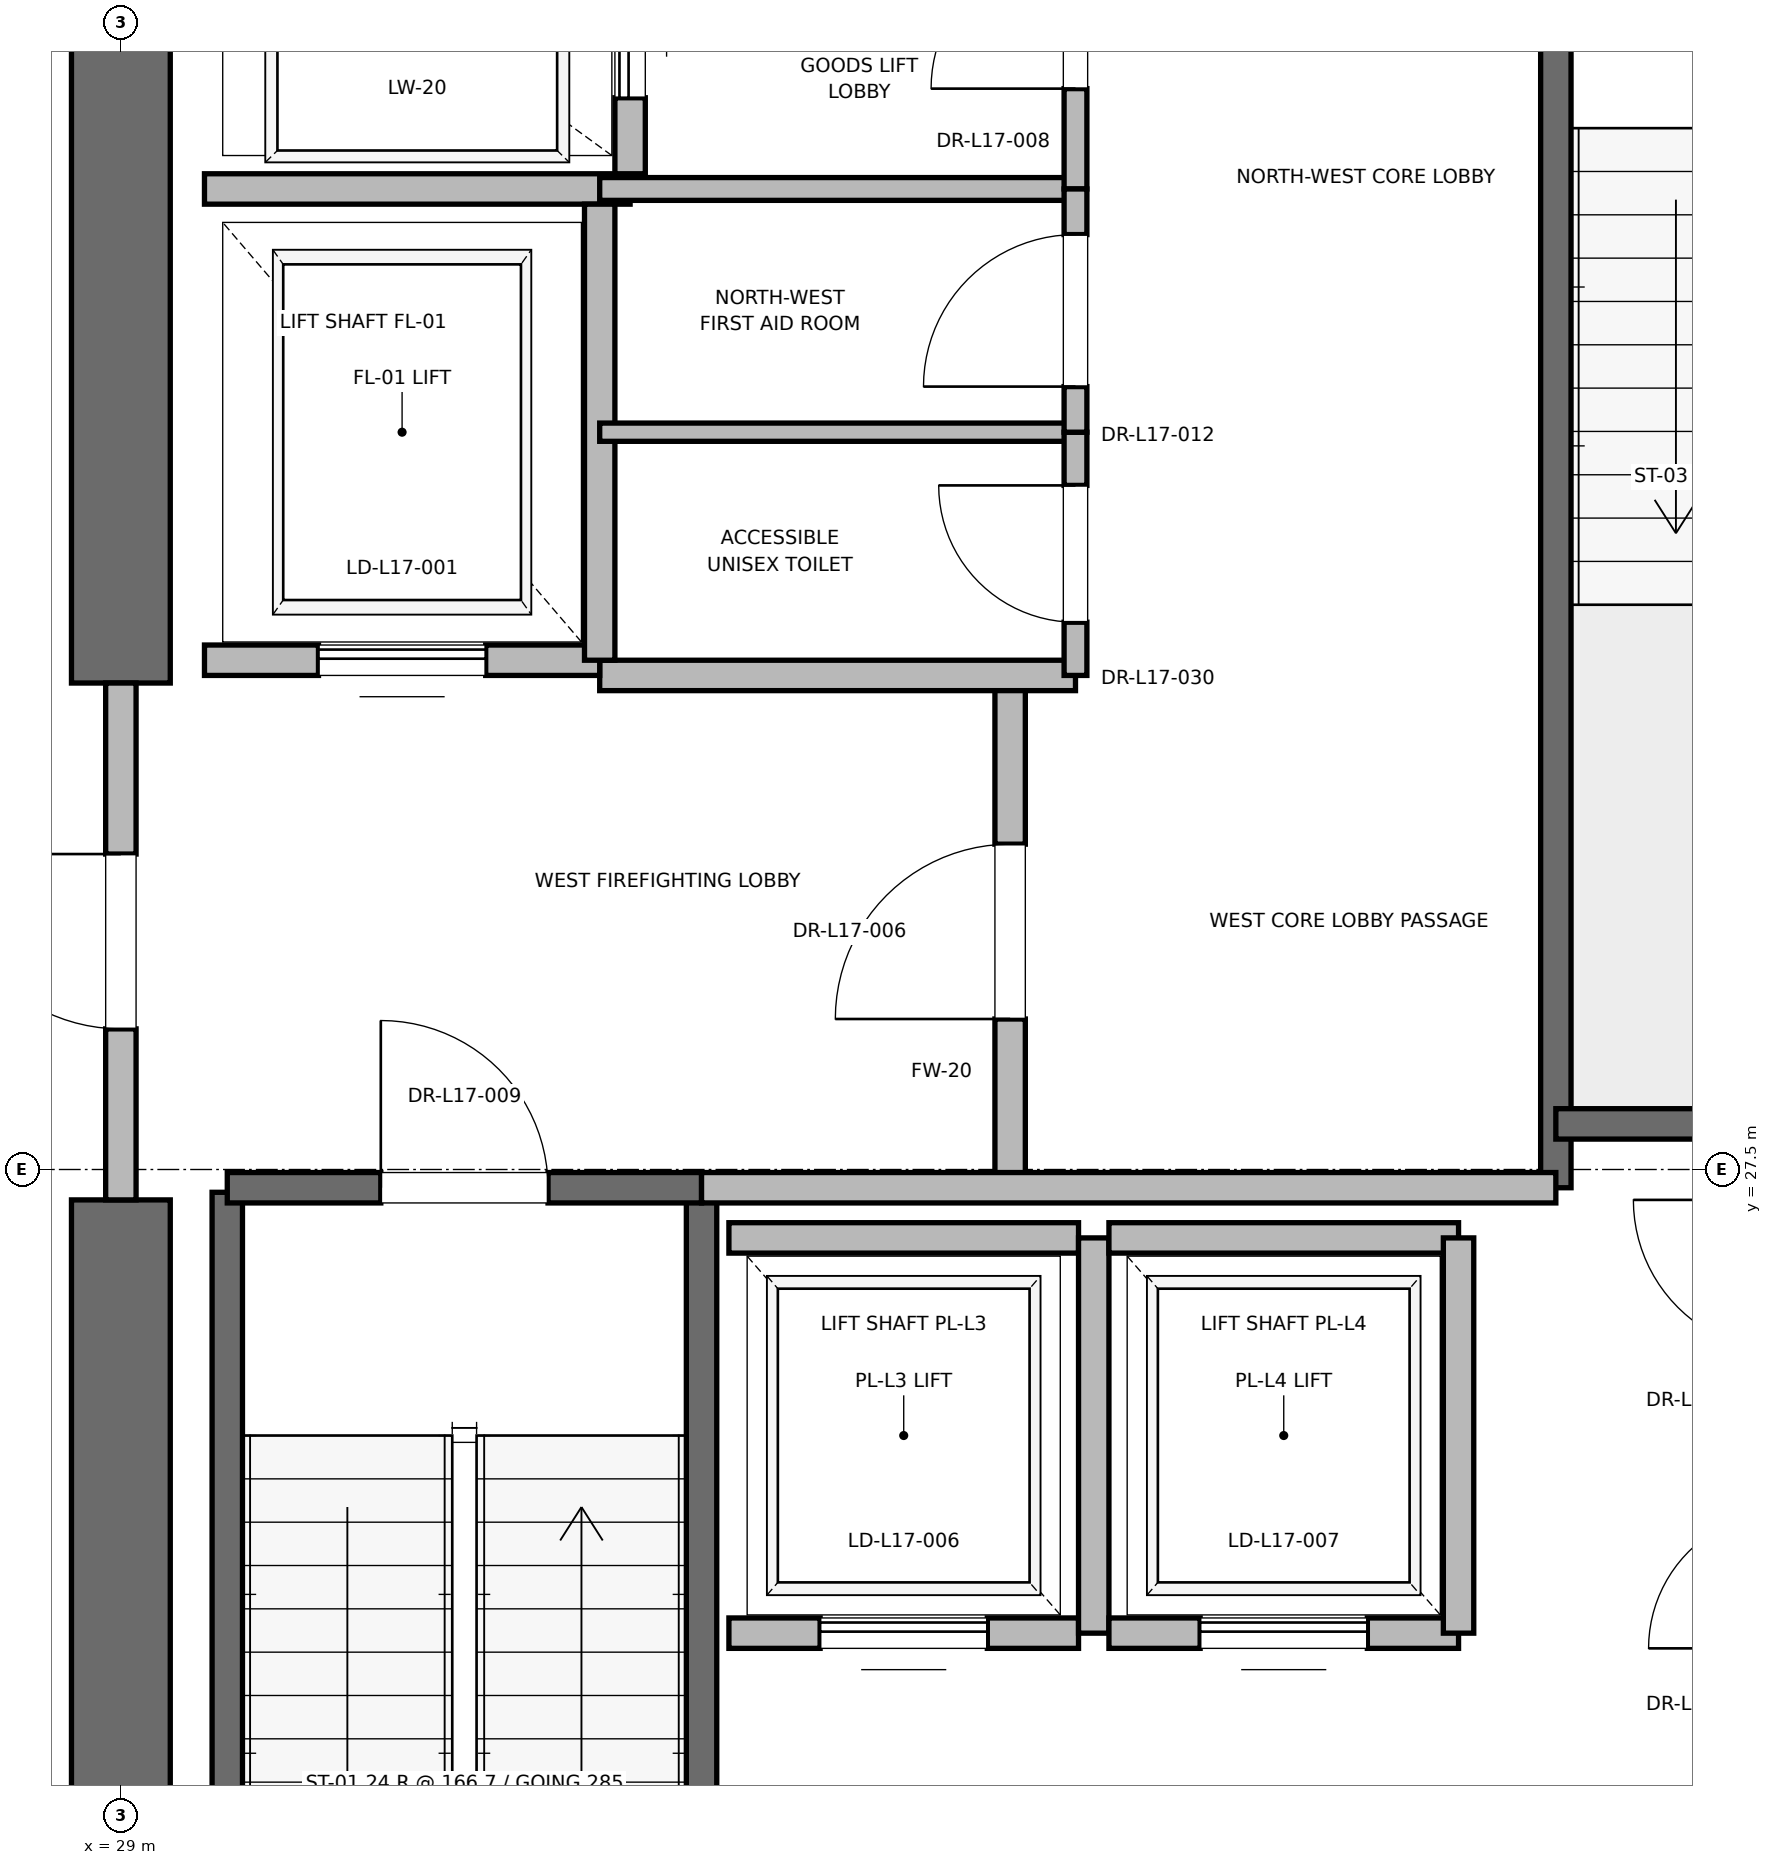
"""IFC4 building model, lengths in metres.
Left out: names, types, materials, properties, quantities, classifications, styles, units other than length and angle.
Written with IfcOpenShell. Run it as: python <this file> out.ifc"""

import sys

from ifc_helpers import new_model, si_unit, direction, frame, frame_2d, origin, place, context, subcontext, project, spatial, rectangle, extrude, element, fill, save


model = new_model("IFC4")
c1 = context("Model", 3, precision=1e-05, world=origin(), true_north=direction((0.0, 1.0)))
c2 = subcontext(c1, "Body", "Model", "MODEL_VIEW")
j1 = project(units=[si_unit("LENGTHUNIT", "METRE"), si_unit("PLANEANGLEUNIT", "RADIAN")], contexts=[c1])
p1 = place(None, origin())
s1 = spatial("IfcSite", under=j1, at=p1, CompositionType="ELEMENT")
p2 = place(p1, origin())
s2 = spatial("IfcBuilding", under=s1, at=p2, CompositionType="ELEMENT")
p3 = place(p2, frame((0.0, 0.0, 75.6)))
s3 = spatial("IfcBuildingStorey", under=s2, at=p3, CompositionType="ELEMENT", Elevation=75.6)
p4 = place(p3, frame((29.0, 18.5, 0.0), z_axis=(0.0, 0.0, 1.0), x_axis=(0.0, 1.0, 0.0)))
e1 = element("IfcWall", 1, at=p4, inside=s3, PredefinedType="SHEAR", context=c2, shape_type="SweptSolid", body=[
    extrude(rectangle(XDim=8.8, YDim=0.65, at=frame_2d((4.4, 0.0))), origin(), (0.0, 0.0, 1.0), 3.76),
])
p5 = place(p3, frame((29.0, 30.7, 0.0), z_axis=(0.0, 0.0, 1.0), x_axis=(0.0, 1.0, 0.0)))
e2 = element("IfcWall", 2, at=p5, inside=s3, PredefinedType="SHEAR", context=c2, shape_type="SweptSolid", body=[
    extrude(rectangle(XDim=5.8, YDim=0.65, at=frame_2d((2.9, 0.0))), origin(), (0.0, 0.0, 1.0), 3.76),
])
p6 = place(p3, frame((29.7, 19.2, 0.0), z_axis=(0.0, 0.0, 1.0), x_axis=(0.0, 1.0, 0.0)))
e3 = element("IfcWall", 3, at=p6, inside=s3, PredefinedType="SOLIDWALL", context=c2, shape_type="SweptSolid", body=[
    extrude(rectangle(XDim=8.15, YDim=0.2, at=frame_2d((4.075, 0.0))), origin(), (0.0, 0.0, 1.0), 3.76),
])
p7 = place(p3, frame((32.82, 18.6, 0.0), z_axis=(0.0, 0.0, 1.0), x_axis=(0.0, 1.0, 0.0)))
e4 = element("IfcWall", 4, at=p7, inside=s3, PredefinedType="SOLIDWALL", context=c2, shape_type="SweptSolid", body=[
    extrude(rectangle(XDim=8.78, YDim=0.2, at=frame_2d((4.39, 0.0))), origin(), (0.0, 0.0, 1.0), 3.76),
])
p8 = place(p3, frame((29.7, 27.38, 0.0), z_axis=(0.0, 0.0, 1.0), x_axis=(1.0, 0.0, 0.0)))
e5 = element("IfcWall", 5, at=p8, inside=s3, PredefinedType="SOLIDWALL", context=c2, shape_type="SweptSolid", body=[
    extrude(rectangle(XDim=3.12, YDim=0.2, at=frame_2d((1.56, 0.0))), origin(), (0.0, 0.0, 1.0), 3.76),
])
p9 = place(p8, frame((1.01, 0.0, 0.0)))
e6 = element("IfcOpeningElement", 6, at=p9, cuts=e5, PredefinedType="OPENING", context=c2, shape_type="SweptSolid", body=[
    extrude(rectangle(XDim=1.1, YDim=2.15, at=frame_2d((0.55, 1.075))), frame((0.0, 0.1, 0.0), z_axis=(0.0, -1.0, 0.0), x_axis=(1.0, 0.0, 0.0)), (0.0, 0.0, 1.0), 0.2),
])
p10 = place(p3, frame((38.44, 27.38, 0.0), z_axis=(0.0, 0.0, 1.0), x_axis=(0.0, 1.0, 0.0)))
e7 = element("IfcWall", 7, at=p10, inside=s3, PredefinedType="SOLIDWALL", context=c2, shape_type="SweptSolid", body=[
    extrude(rectangle(XDim=8.87, YDim=0.2, at=frame_2d((4.435, 0.0))), origin(), (0.0, 0.0, 1.0), 3.76),
])
p11 = place(p3, frame((38.44, 27.8, 0.0), z_axis=(0.0, 0.0, 1.0), x_axis=(1.0, 0.0, 0.0)))
e8 = element("IfcWall", 8, at=p11, inside=s3, PredefinedType="SOLIDWALL", context=c2, shape_type="SweptSolid", body=[
    extrude(rectangle(XDim=3.32, YDim=0.2, at=frame_2d((1.66, 0.0))), origin(), (0.0, 0.0, 1.0), 3.76),
])
p12 = place(p3, frame((34.85, 27.38, 0.0), z_axis=(0.0, 0.0, 1.0), x_axis=(0.0, 1.0, 0.0)))
e9 = element("IfcWall", 9, at=p12, inside=s3, PredefinedType="PARTITIONING", context=c2, shape_type="SweptSolid", body=[
    extrude(rectangle(XDim=3.37, YDim=0.2, at=frame_2d((1.685, 0.0))), origin(), (0.0, 0.0, 1.0), 3.76),
])
p13 = place(p12, frame((1.11, 0.0, 0.0)))
e10 = element("IfcOpeningElement", 10, at=p13, cuts=e9, PredefinedType="OPENING", context=c2, shape_type="SweptSolid", body=[
    extrude(rectangle(XDim=1.15, YDim=2.2, at=frame_2d((0.575, 1.1))), frame((0.0, 0.1, 0.0), z_axis=(0.0, -1.0, 0.0), x_axis=(1.0, 0.0, 0.0)), (0.0, 0.0, 1.0), 0.2),
])
p14 = place(p3, frame((29.0, 27.3, 0.0), z_axis=(0.0, 0.0, 1.0), x_axis=(0.0, 1.0, 0.0)))
e11 = element("IfcWall", 11, at=p14, inside=s3, PredefinedType="PARTITIONING", context=c2, shape_type="SweptSolid", body=[
    extrude(rectangle(XDim=3.4, YDim=0.2, at=frame_2d((1.7, 0.0))), origin(), (0.0, 0.0, 1.0), 2.54),
])
p15 = place(p14, frame((1.125, 0.0, 0.0)))
e12 = element("IfcOpeningElement", 12, at=p15, cuts=e11, PredefinedType="OPENING", context=c2, shape_type="SweptSolid", body=[
    extrude(rectangle(XDim=1.15, YDim=2.2, at=frame_2d((0.575, 1.1))), frame((0.0, 0.1, 0.0), z_axis=(0.0, -1.0, 0.0), x_axis=(1.0, 0.0, 0.0)), (0.0, 0.0, 1.0), 0.2),
])
p16 = place(p3, frame((32.82, 27.38, 0.0), z_axis=(0.0, 0.0, 1.0), x_axis=(1.0, 0.0, 0.0)))
e13 = element("IfcWall", 13, at=p16, inside=s3, PredefinedType="PARTITIONING", context=c2, shape_type="SweptSolid", body=[
    extrude(rectangle(XDim=5.62, YDim=0.2, at=frame_2d((2.81, 0.0))), origin(), (0.0, 0.0, 1.0), 3.76),
])
p17 = place(p3, frame((32.15, 30.75, 0.0), z_axis=(0.0, 0.0, 1.0), x_axis=(1.0, 0.0, 0.0)))
e14 = element("IfcWall", 14, at=p17, inside=s3, PredefinedType="PARTITIONING", context=c2, shape_type="SweptSolid", body=[
    extrude(rectangle(XDim=3.13, YDim=0.2, at=frame_2d((1.565, 0.0))), origin(), (0.0, 0.0, 1.0), 3.76),
])
p18 = place(p3, frame((29.55, 30.85, 0.0), z_axis=(0.0, 0.0, 1.0), x_axis=(1.0, 0.0, 0.0)))
e15 = element("IfcWall", 15, at=p18, inside=s3, PredefinedType="SOLIDWALL", context=c2, shape_type="SweptSolid", body=[
    extrude(rectangle(XDim=2.6, YDim=0.2, at=frame_2d((1.3, 0.0))), origin(), (0.0, 0.0, 1.0), 2.54),
])
p19 = place(p18, frame((0.75, 0.0, 0.0)))
e16 = element("IfcOpeningElement", 16, at=p19, cuts=e15, PredefinedType="OPENING", context=c2, shape_type="SweptSolid", body=[
    extrude(rectangle(XDim=1.1, YDim=2.2, at=frame_2d((0.55, 1.1))), frame((0.0, 0.1, 0.0), z_axis=(0.0, -1.0, 0.0), x_axis=(1.0, 0.0, 0.0)), (0.0, 0.0, 1.0), 0.2),
])
p20 = place(p3, frame((29.55, 33.95, 0.0), z_axis=(0.0, 0.0, 1.0), x_axis=(1.0, 0.0, 0.0)))
e17 = element("IfcWall", 17, at=p20, inside=s3, PredefinedType="SOLIDWALL", context=c2, shape_type="SweptSolid", body=[
    extrude(rectangle(XDim=2.8, YDim=0.2, at=frame_2d((1.4, 0.0))), origin(), (0.0, 0.0, 1.0), 3.76),
])
p21 = place(p3, frame((32.15, 30.85, 0.0), z_axis=(0.0, 0.0, 1.0), x_axis=(0.0, 1.0, 0.0)))
e18 = element("IfcWall", 18, at=p21, inside=s3, PredefinedType="SOLIDWALL", context=c2, shape_type="SweptSolid", body=[
    extrude(rectangle(XDim=3.0, YDim=0.2, at=frame_2d((1.5, 0.0))), origin(), (0.0, 0.0, 1.0), 3.76),
])
p22 = place(p3, frame((32.35, 34.05, 0.0), z_axis=(0.0, 0.0, 1.0), x_axis=(0.0, 1.0, 0.0)))
e19 = element("IfcWall", 19, at=p22, inside=s3, PredefinedType="SOLIDWALL", context=c2, shape_type="SweptSolid", body=[
    extrude(rectangle(XDim=2.1, YDim=0.2, at=frame_2d((1.05, 0.0))), origin(), (0.0, 0.0, 1.0), 3.76),
])
p23 = place(p22, frame((0.5, 0.0, 0.0)))
e20 = element("IfcOpeningElement", 20, at=p23, cuts=e19, PredefinedType="OPENING", context=c2, shape_type="SweptSolid", body=[
    extrude(rectangle(XDim=1.1, YDim=2.2, at=frame_2d((0.55, 1.1))), frame((0.0, 0.1, 0.0), z_axis=(0.0, -1.0, 0.0), x_axis=(1.0, 0.0, 0.0)), (0.0, 0.0, 1.0), 0.2),
])
p24 = place(p3, frame((33.0, 24.45, 0.0), z_axis=(0.0, 0.0, 1.0), x_axis=(1.0, 0.0, 0.0)))
e21 = element("IfcWall", 21, at=p24, inside=s3, PredefinedType="SOLIDWALL", context=c2, shape_type="SweptSolid", body=[
    extrude(rectangle(XDim=2.3, YDim=0.2, at=frame_2d((1.15, 0.0))), origin(), (0.0, 0.0, 1.0), 3.76),
])
p25 = place(p24, frame((0.6, 0.0, 0.0)))
e22 = element("IfcOpeningElement", 22, at=p25, cuts=e21, PredefinedType="OPENING", context=c2, shape_type="SweptSolid", body=[
    extrude(rectangle(XDim=1.1, YDim=2.2, at=frame_2d((0.55, 1.1))), frame((0.0, 0.1, 0.0), z_axis=(0.0, -1.0, 0.0), x_axis=(1.0, 0.0, 0.0)), (0.0, 0.0, 1.0), 0.2),
])
p26 = place(p3, frame((35.3, 27.05, 0.0), z_axis=(0.0, 0.0, 1.0), x_axis=(-1.0, 0.0, 0.0)))
e23 = element("IfcWall", 23, at=p26, inside=s3, PredefinedType="SOLIDWALL", context=c2, shape_type="SweptSolid", body=[
    extrude(rectangle(XDim=2.3, YDim=0.2, at=frame_2d((1.15, 0.0))), origin(), (0.0, 0.0, 1.0), 3.76),
])
p27 = place(p3, frame((35.4, 24.45, 0.0), z_axis=(0.0, 0.0, 1.0), x_axis=(0.0, 1.0, 0.0)))
e24 = element("IfcWall", 24, at=p27, inside=s3, PredefinedType="SOLIDWALL", context=c2, shape_type="SweptSolid", body=[
    extrude(rectangle(XDim=2.6, YDim=0.2, at=frame_2d((1.3, 0.0))), origin(), (0.0, 0.0, 1.0), 3.76),
])
p28 = place(p3, frame((35.5, 24.45, 0.0), z_axis=(0.0, 0.0, 1.0), x_axis=(1.0, 0.0, 0.0)))
e25 = element("IfcWall", 25, at=p28, inside=s3, PredefinedType="SOLIDWALL", context=c2, shape_type="SweptSolid", body=[
    extrude(rectangle(XDim=2.3, YDim=0.2, at=frame_2d((1.15, 0.0))), origin(), (0.0, 0.0, 1.0), 3.76),
])
p29 = place(p28, frame((0.6, 0.0, 0.0)))
e26 = element("IfcOpeningElement", 26, at=p29, cuts=e25, PredefinedType="OPENING", context=c2, shape_type="SweptSolid", body=[
    extrude(rectangle(XDim=1.1, YDim=2.2, at=frame_2d((0.55, 1.1))), frame((0.0, 0.1, 0.0), z_axis=(0.0, -1.0, 0.0), x_axis=(1.0, 0.0, 0.0)), (0.0, 0.0, 1.0), 0.2),
])
p30 = place(p3, frame((37.8, 27.05, 0.0), z_axis=(0.0, 0.0, 1.0), x_axis=(-1.0, 0.0, 0.0)))
e27 = element("IfcWall", 27, at=p30, inside=s3, PredefinedType="SOLIDWALL", context=c2, shape_type="SweptSolid", body=[
    extrude(rectangle(XDim=2.3, YDim=0.2, at=frame_2d((1.15, 0.0))), origin(), (0.0, 0.0, 1.0), 3.76),
])
p31 = place(p3, frame((37.8, 24.45, 0.0), z_axis=(0.0, 0.0, 1.0), x_axis=(0.0, 1.0, 0.0)))
e28 = element("IfcWall", 28, at=p31, inside=s3, PredefinedType="SOLIDWALL", context=c2, shape_type="SweptSolid", body=[
    extrude(rectangle(XDim=2.6, YDim=0.2, at=frame_2d((1.3, 0.0))), origin(), (0.0, 0.0, 1.0), 3.76),
])
p32 = place(p3, frame((32.15, 33.95, 0.0), z_axis=(0.0, 0.0, 1.0), x_axis=(1.0, 0.0, 0.0)))
e29 = element("IfcWall", 29, at=p32, inside=s3, PredefinedType="PARTITIONING", context=c2, shape_type="SweptSolid", body=[
    extrude(rectangle(XDim=3.13, YDim=0.15, at=frame_2d((1.565, 0.0))), origin(), (0.0, 0.0, 1.0), 2.85),
])
p33 = place(p3, frame((35.28, 33.95, 0.0), z_axis=(0.0, 0.0, 1.0), x_axis=(0.0, 1.0, 0.0)))
e30 = element("IfcWall", 30, at=p33, inside=s3, PredefinedType="PARTITIONING", context=c2, shape_type="SweptSolid", body=[
    extrude(rectangle(XDim=2.27, YDim=0.15, at=frame_2d((1.135, 0.0))), origin(), (0.0, 0.0, 1.0), 2.54),
])
p34 = place(p33, frame((0.66, 0.0, 0.0)))
e31 = element("IfcOpeningElement", 31, at=p34, cuts=e30, PredefinedType="OPENING", context=c2, shape_type="SweptSolid", body=[
    extrude(rectangle(XDim=0.95, YDim=2.15, at=frame_2d((0.475, 1.075))), frame((0.0, 0.075, 0.0), z_axis=(0.0, -1.0, 0.0), x_axis=(1.0, 0.0, 0.0)), (0.0, 0.0, 1.0), 0.15),
])
p35 = place(p3, frame((32.15, 32.35, 0.0), z_axis=(0.0, 0.0, 1.0), x_axis=(1.0, 0.0, 0.0)))
e32 = element("IfcWall", 32, at=p35, inside=s3, PredefinedType="PARTITIONING", context=c2, shape_type="SweptSolid", body=[
    extrude(rectangle(XDim=3.13, YDim=0.12, at=frame_2d((1.565, 0.0))), origin(), (0.0, 0.0, 1.0), 2.85),
])
p36 = place(p3, frame((35.28, 30.75, 0.0), z_axis=(0.0, 0.0, 1.0), x_axis=(0.0, 1.0, 0.0)))
e33 = element("IfcWall", 33, at=p36, inside=s3, PredefinedType="PARTITIONING", context=c2, shape_type="SweptSolid", body=[
    extrude(rectangle(XDim=1.6, YDim=0.15, at=frame_2d((0.8, 0.0))), origin(), (0.0, 0.0, 1.0), 2.85),
])
p37 = place(p36, frame((0.35, 0.0, 0.0)))
e34 = element("IfcOpeningElement", 34, at=p37, cuts=e33, PredefinedType="OPENING", context=c2, shape_type="SweptSolid", body=[
    extrude(rectangle(XDim=0.9, YDim=2.1, at=frame_2d((0.45, 1.05))), frame((0.0, 0.075, 0.0), z_axis=(0.0, -1.0, 0.0), x_axis=(1.0, 0.0, 0.0)), (0.0, 0.0, 1.0), 0.15),
])
p38 = place(p3, frame((35.28, 32.35, 0.0), z_axis=(0.0, 0.0, 1.0), x_axis=(0.0, 1.0, 0.0)))
e35 = element("IfcWall", 35, at=p38, inside=s3, PredefinedType="PARTITIONING", context=c2, shape_type="SweptSolid", body=[
    extrude(rectangle(XDim=1.6, YDim=0.15, at=frame_2d((0.8, 0.0))), origin(), (0.0, 0.0, 1.0), 2.85),
])
p39 = place(p38, frame((0.3, 0.0, 0.0)))
e36 = element("IfcOpeningElement", 36, at=p39, cuts=e35, PredefinedType="OPENING", context=c2, shape_type="SweptSolid", body=[
    extrude(rectangle(XDim=1.0, YDim=2.15, at=frame_2d((0.5, 1.075))), frame((0.0, 0.075, 0.0), z_axis=(0.0, -1.0, 0.0), x_axis=(1.0, 0.0, 0.0)), (0.0, 0.0, 1.0), 0.15),
])
p40 = place(p9, origin())
e37 = element("IfcDoor", 37, at=p40, inside=s3, OperationType="SINGLE_SWING_LEFT", PredefinedType="DOOR", context=c2, shape_type="SweptSolid", body=[
    extrude(rectangle(XDim=1.1, YDim=2.15, at=frame_2d((0.55, 1.075))), frame((0.0, 0.025, 0.0), z_axis=(0.0, -1.0, 0.0), x_axis=(1.0, 0.0, 0.0)), (0.0, 0.0, 1.0), 0.05),
])
fill(e6, e37)
p41 = place(p13, origin())
e38 = element("IfcDoor", 38, at=p41, inside=s3, OperationType="SINGLE_SWING_LEFT", PredefinedType="DOOR", context=c2, shape_type="SweptSolid", body=[
    extrude(rectangle(XDim=1.15, YDim=2.2, at=frame_2d((0.575, 1.1))), frame((0.0, 0.025, 0.0), z_axis=(0.0, -1.0, 0.0), x_axis=(1.0, 0.0, 0.0)), (0.0, 0.0, 1.0), 0.05),
])
fill(e10, e38)
p42 = place(p15, origin())
e39 = element("IfcDoor", 39, at=p42, inside=s3, OperationType="SINGLE_SWING_RIGHT", PredefinedType="DOOR", context=c2, shape_type="SweptSolid", body=[
    extrude(rectangle(XDim=1.15, YDim=2.2, at=frame_2d((0.575, 1.1))), frame((0.0, 0.025, 0.0), z_axis=(0.0, -1.0, 0.0), x_axis=(1.0, 0.0, 0.0)), (0.0, 0.0, 1.0), 0.05),
])
fill(e12, e39)
p43 = place(p19, origin())
e40 = element("IfcDoor", 40, at=p43, inside=s3, OperationType="SLIDING_TO_RIGHT", PredefinedType="DOOR", context=c2, shape_type="SweptSolid", body=[
    extrude(rectangle(XDim=1.1, YDim=2.2, at=frame_2d((0.55, 1.1))), frame((0.0, 0.025, 0.0), z_axis=(0.0, -1.0, 0.0), x_axis=(1.0, 0.0, 0.0)), (0.0, 0.0, 1.0), 0.05),
])
fill(e16, e40)
p44 = place(p23, origin())
e41 = element("IfcDoor", 41, at=p44, inside=s3, OperationType="SLIDING_TO_RIGHT", PredefinedType="DOOR", context=c2, shape_type="SweptSolid", body=[
    extrude(rectangle(XDim=1.1, YDim=2.2, at=frame_2d((0.55, 1.1))), frame((0.0, 0.025, 0.0), z_axis=(0.0, -1.0, 0.0), x_axis=(1.0, 0.0, 0.0)), (0.0, 0.0, 1.0), 0.05),
])
fill(e20, e41)
p45 = place(p25, origin())
e42 = element("IfcDoor", 42, at=p45, inside=s3, OperationType="SLIDING_TO_RIGHT", PredefinedType="DOOR", context=c2, shape_type="SweptSolid", body=[
    extrude(rectangle(XDim=1.1, YDim=2.2, at=frame_2d((0.55, 1.1))), frame((0.0, 0.025, 0.0), z_axis=(0.0, -1.0, 0.0), x_axis=(1.0, 0.0, 0.0)), (0.0, 0.0, 1.0), 0.05),
])
fill(e22, e42)
p46 = place(p29, origin())
e43 = element("IfcDoor", 43, at=p46, inside=s3, OperationType="SLIDING_TO_RIGHT", PredefinedType="DOOR", context=c2, shape_type="SweptSolid", body=[
    extrude(rectangle(XDim=1.1, YDim=2.2, at=frame_2d((0.55, 1.1))), frame((0.0, 0.025, 0.0), z_axis=(0.0, -1.0, 0.0), x_axis=(1.0, 0.0, 0.0)), (0.0, 0.0, 1.0), 0.05),
])
fill(e26, e43)
p47 = place(p34, origin())
e44 = element("IfcDoor", 44, at=p47, inside=s3, OperationType="SINGLE_SWING_LEFT", PredefinedType="DOOR", context=c2, shape_type="SweptSolid", body=[
    extrude(rectangle(XDim=0.95, YDim=2.15, at=frame_2d((0.475, 1.075))), frame((0.0, 0.025, 0.0), z_axis=(0.0, -1.0, 0.0), x_axis=(1.0, 0.0, 0.0)), (0.0, 0.0, 1.0), 0.05),
])
fill(e31, e44)
p48 = place(p37, origin())
e45 = element("IfcDoor", 45, at=p48, inside=s3, OperationType="SINGLE_SWING_RIGHT", PredefinedType="DOOR", context=c2, shape_type="SweptSolid", body=[
    extrude(rectangle(XDim=0.9, YDim=2.1, at=frame_2d((0.45, 1.05))), frame((0.0, 0.025, 0.0), z_axis=(0.0, -1.0, 0.0), x_axis=(1.0, 0.0, 0.0)), (0.0, 0.0, 1.0), 0.05),
])
fill(e34, e45)
p49 = place(p39, origin())
e46 = element("IfcDoor", 46, at=p49, inside=s3, OperationType="SINGLE_SWING_LEFT", PredefinedType="DOOR", context=c2, shape_type="SweptSolid", body=[
    extrude(rectangle(XDim=1.0, YDim=2.15, at=frame_2d((0.5, 1.075))), frame((0.0, 0.025, 0.0), z_axis=(0.0, -1.0, 0.0), x_axis=(1.0, 0.0, 0.0)), (0.0, 0.0, 1.0), 0.05),
])
fill(e36, e46)
save(model, sys.argv[1])
